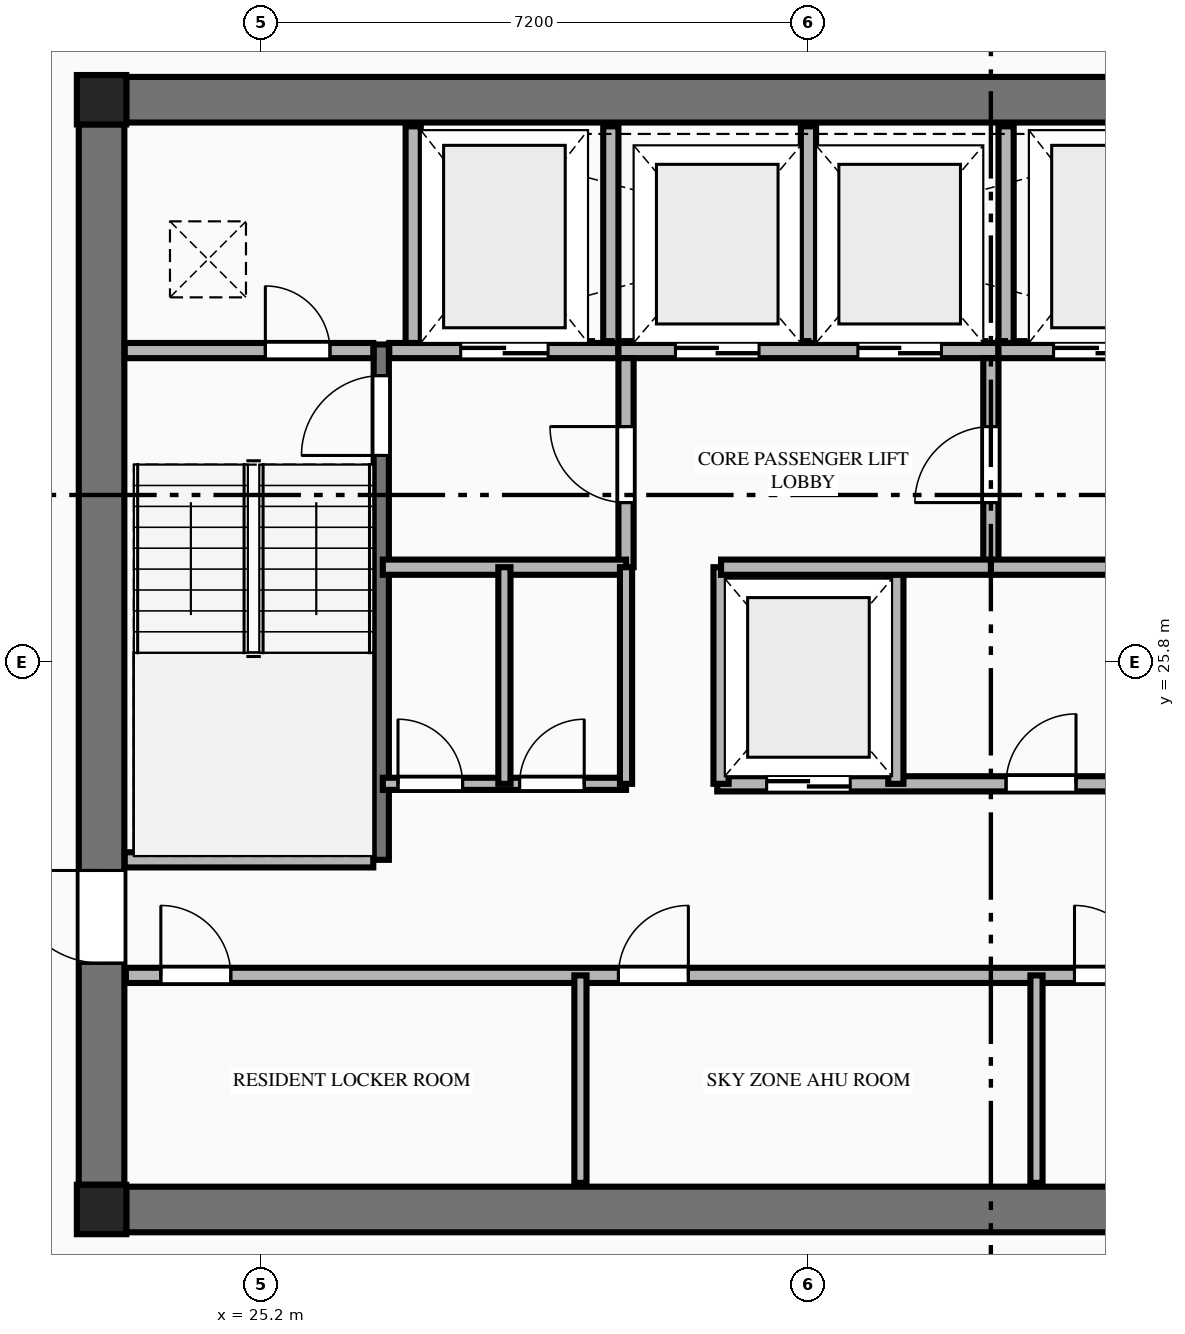
"""IFC4 building model, lengths in metres.
Left out: names, types, materials, properties, quantities, classifications, styles, units other than length and angle.
Written with IfcOpenShell. Run it as: python <this file> out.ifc"""

import sys

from ifc_helpers import new_model, si_unit, direction, frame, frame_2d, origin, origin_2d, place, context, subcontext, project, spatial, rectangle, extrude, element, fill, save


model = new_model("IFC4")
c1 = context("Model", 3, precision=1e-05, world=origin(), true_north=direction((0.0, 1.0)))
c2 = subcontext(c1, "Body", "Model", "MODEL_VIEW")
j1 = project(units=[si_unit("LENGTHUNIT", "METRE"), si_unit("PLANEANGLEUNIT", "RADIAN")], contexts=[c1])
p1 = place(None, origin())
s1 = spatial("IfcSite", under=j1, at=p1, CompositionType="ELEMENT")
p2 = place(p1, origin())
s2 = spatial("IfcBuilding", under=s1, at=p2, CompositionType="ELEMENT")
p3 = place(p2, frame((0.0, 0.0, 186.1)))
s3 = spatial("IfcBuildingStorey", under=s2, at=p3, CompositionType="ELEMENT", Elevation=186.1)
for number, where, z_axis, x_axis in (
    (1, (23.1, 18.6, 0.0), (0.0, 0.0, 1.0), (1.0, 0.0, 0.0)),
    (2, (23.1, 33.2, 0.0), (0.0, 0.0, 1.0), (1.0, 0.0, 0.0)),
):
    element("IfcColumn", number, at=place(p3, frame(where, z_axis=z_axis, x_axis=x_axis)), inside=s3, PredefinedType="COLUMN", context=c2, shape_type="SweptSolid", body=[
        extrude(rectangle(XDim=0.65, YDim=0.65, at=origin_2d()), origin(), (0.0, 0.0, 1.0), 3.55),
    ])
for number, where, z_axis, x_axis in (
    (3, (23.425, 18.6, 0.0), (0.0, 0.0, 1.0), (1.0, 0.0, 0.0)),
    (4, (23.425, 33.2, 0.0), (0.0, 0.0, 1.0), (1.0, 0.0, 0.0)),
):
    element("IfcWall", number, at=place(p3, frame(where, z_axis=z_axis, x_axis=x_axis)), inside=s3, PredefinedType="SHEAR", context=c2, shape_type="SweptSolid", body=[
        extrude(rectangle(XDim=17.95, YDim=0.6, at=frame_2d((8.975, 0.0))), origin(), (0.0, 0.0, 1.0), 3.35),
    ])
p4 = place(p3, frame((23.1, 18.925, 0.0), z_axis=(0.0, 0.0, 1.0), x_axis=(0.0, 1.0, 0.0)))
e5 = element("IfcWall", 5, at=p4, inside=s3, PredefinedType="SHEAR", context=c2, shape_type="SweptSolid", body=[
    extrude(rectangle(XDim=13.95, YDim=0.6, at=frame_2d((6.975, 0.0))), origin(), (0.0, 0.0, 1.0), 3.35),
])
p5 = place(p4, frame((2.915, 0.0, 0.0)))
e6 = element("IfcOpeningElement", 6, at=p5, cuts=e5, PredefinedType="OPENING", context=c2, shape_type="SweptSolid", body=[
    extrude(rectangle(XDim=1.22, YDim=2.25, at=frame_2d((0.61, 1.125))), frame((0.0, 0.31, 0.0), z_axis=(0.0, -1.0, 0.0), x_axis=(1.0, 0.0, 0.0)), (0.0, 0.0, 1.0), 0.62),
])
p6 = place(p3, frame((26.78, 23.2, 0.0), z_axis=(0.0, 0.0, 1.0), x_axis=(0.0, 1.0, 0.0)))
e7 = element("IfcWall", 7, at=p6, inside=s3, PredefinedType="SHEAR", context=c2, shape_type="SweptSolid", body=[
    extrude(rectangle(XDim=6.78, YDim=0.2, at=frame_2d((3.39, 0.0))), origin(), (0.0, 0.0, 1.0), 3.55),
])
p7 = place(p6, frame((5.32, 0.0, 0.0)))
e8 = element("IfcOpeningElement", 8, at=p7, cuts=e7, PredefinedType="OPENING", context=c2, shape_type="SweptSolid", body=[
    extrude(rectangle(XDim=1.05, YDim=2.15, at=frame_2d((0.525, 1.075))), frame((0.0, 0.11, 0.0), z_axis=(0.0, -1.0, 0.0), x_axis=(1.0, 0.0, 0.0)), (0.0, 0.0, 1.0), 0.22),
])
p8 = place(p3, frame((23.405, 23.2, 0.0), z_axis=(0.0, 0.0, 1.0), x_axis=(1.0, 0.0, 0.0)))
e9 = element("IfcWall", 9, at=p8, inside=s3, PredefinedType="PLUMBINGWALL", context=c2, shape_type="SweptSolid", body=[
    extrude(rectangle(XDim=3.27, YDim=0.2, at=frame_2d((1.635, 0.0))), origin(), (0.0, 0.0, 1.0), 3.35),
])
p9 = place(p3, frame((23.405, 29.9, 0.0), z_axis=(0.0, 0.0, 1.0), x_axis=(1.0, 0.0, 0.0)))
e10 = element("IfcWall", 10, at=p9, inside=s3, PredefinedType="PLUMBINGWALL", context=c2, shape_type="SweptSolid", body=[
    extrude(rectangle(XDim=3.27, YDim=0.2, at=frame_2d((1.635, 0.0))), origin(), (0.0, 0.0, 1.0), 3.35),
])
p10 = place(p9, frame((1.85, 0.0, 0.0)))
e11 = element("IfcOpeningElement", 11, at=p10, cuts=e10, PredefinedType="OPENING", context=c2, shape_type="SweptSolid", body=[
    extrude(rectangle(XDim=0.85, YDim=2.05, at=frame_2d((0.425, 1.025))), frame((0.0, 0.11, 0.0), z_axis=(0.0, -1.0, 0.0), x_axis=(1.0, 0.0, 0.0)), (0.0, 0.0, 1.0), 0.22),
])
p11 = place(p3, frame((26.885, 29.9, 0.0), z_axis=(0.0, 0.0, 1.0), x_axis=(1.0, 0.0, 0.0)))
e12 = element("IfcWall", 12, at=p11, inside=s3, PredefinedType="PLUMBINGWALL", context=c2, shape_type="SweptSolid", body=[
    extrude(rectangle(XDim=3.015, YDim=0.2, at=frame_2d((1.507, 0.0))), origin(), (0.0, 0.0, 1.0), 3.35),
])
p12 = place(p11, frame((0.94, 0.0, 0.0)))
e13 = element("IfcOpeningElement", 13, at=p12, cuts=e12, PredefinedType="OPENING", context=c2, shape_type="SweptSolid", body=[
    extrude(rectangle(XDim=1.15, YDim=2.2, at=frame_2d((0.575, 1.1))), frame((0.0, 0.11, 0.0), z_axis=(0.0, -1.0, 0.0), x_axis=(1.0, 0.0, 0.0)), (0.0, 0.0, 1.0), 0.22),
])
p13 = place(p3, frame((29.9, 29.9, 0.0), z_axis=(0.0, 0.0, 1.0), x_axis=(1.0, 0.0, 0.0)))
e14 = element("IfcWall", 14, at=p13, inside=s3, PredefinedType="PLUMBINGWALL", context=c2, shape_type="SweptSolid", body=[
    extrude(rectangle(XDim=5.0, YDim=0.2, at=frame_2d((2.5, 0.0))), origin(), (0.0, 0.0, 1.0), 3.35),
])
p14 = place(p13, frame((0.75, 0.0, 0.0)))
e15 = element("IfcOpeningElement", 15, at=p14, cuts=e14, PredefinedType="OPENING", context=c2, shape_type="SweptSolid", body=[
    extrude(rectangle(XDim=1.1, YDim=2.2, at=frame_2d((0.55, 1.1))), frame((0.0, 0.11, 0.0), z_axis=(0.0, -1.0, 0.0), x_axis=(1.0, 0.0, 0.0)), (0.0, 0.0, 1.0), 0.22),
])
p15 = place(p13, frame((3.15, 0.0, 0.0)))
e16 = element("IfcOpeningElement", 16, at=p15, cuts=e14, PredefinedType="OPENING", context=c2, shape_type="SweptSolid", body=[
    extrude(rectangle(XDim=1.1, YDim=2.2, at=frame_2d((0.55, 1.1))), frame((0.0, 0.11, 0.0), z_axis=(0.0, -1.0, 0.0), x_axis=(1.0, 0.0, 0.0)), (0.0, 0.0, 1.0), 0.22),
])
p16 = place(p3, frame((34.9, 29.9, 0.0), z_axis=(0.0, 0.0, 1.0), x_axis=(1.0, 0.0, 0.0)))
e17 = element("IfcWall", 17, at=p16, inside=s3, PredefinedType="PLUMBINGWALL", context=c2, shape_type="SweptSolid", body=[
    extrude(rectangle(XDim=3.015, YDim=0.2, at=frame_2d((1.508, 0.0))), origin(), (0.0, 0.0, 1.0), 3.35),
])
p17 = place(p16, frame((0.725, 0.0, 0.0)))
e18 = element("IfcOpeningElement", 18, at=p17, cuts=e17, PredefinedType="OPENING", context=c2, shape_type="SweptSolid", body=[
    extrude(rectangle(XDim=1.15, YDim=2.2, at=frame_2d((0.575, 1.1))), frame((0.0, 0.11, 0.0), z_axis=(0.0, -1.0, 0.0), x_axis=(1.0, 0.0, 0.0)), (0.0, 0.0, 1.0), 0.22),
])
for number, where, z_axis, x_axis in (
    (19, (27.2, 30.0, 0.0), (0.0, 0.0, 1.0), (0.0, 1.0, 0.0)),
    (20, (29.8, 30.0, 0.0), (0.0, 0.0, 1.0), (0.0, 1.0, 0.0)),
    (21, (32.4, 30.0, 0.0), (0.0, 0.0, 1.0), (0.0, 1.0, 0.0)),
    (22, (35.0, 30.0, 0.0), (0.0, 0.0, 1.0), (0.0, 1.0, 0.0)),
):
    element("IfcWall", number, at=place(p3, frame(where, z_axis=z_axis, x_axis=x_axis)), inside=s3, PredefinedType="PLUMBINGWALL", context=c2, shape_type="SweptSolid", body=[
        extrude(rectangle(XDim=2.85, YDim=0.2, at=frame_2d((1.425, 0.0))), origin(), (0.0, 0.0, 1.0), 3.35),
    ])
p18 = place(p3, frame((30.0, 27.05, 0.0), z_axis=(0.0, 0.0, 1.0), x_axis=(0.0, 1.0, 0.0)))
e23 = element("IfcWall", 23, at=p18, inside=s3, PredefinedType="PLUMBINGWALL", context=c2, shape_type="SweptSolid", body=[
    extrude(rectangle(XDim=2.75, YDim=0.2, at=frame_2d((1.375, 0.0))), origin(), (0.0, 0.0, 1.0), 3.35),
])
p19 = place(p18, frame((0.85, 0.0, 0.0)))
e24 = element("IfcOpeningElement", 24, at=p19, cuts=e23, PredefinedType="OPENING", context=c2, shape_type="SweptSolid", body=[
    extrude(rectangle(XDim=1.0, YDim=2.15, at=frame_2d((0.5, 1.075))), frame((0.0, 0.11, 0.0), z_axis=(0.0, -1.0, 0.0), x_axis=(1.0, 0.0, 0.0)), (0.0, 0.0, 1.0), 0.22),
])
p20 = place(p3, frame((26.8, 27.05, 0.0), z_axis=(0.0, 0.0, 1.0), x_axis=(1.0, 0.0, 0.0)))
e25 = element("IfcWall", 25, at=p20, inside=s3, PredefinedType="PLUMBINGWALL", context=c2, shape_type="SweptSolid", body=[
    extrude(rectangle(XDim=3.2, YDim=0.2, at=frame_2d((1.6, 0.0))), origin(), (0.0, 0.0, 1.0), 3.35),
])
p21 = place(p3, frame((34.8, 27.05, 0.0), z_axis=(0.0, 0.0, 1.0), x_axis=(0.0, 1.0, 0.0)))
e26 = element("IfcWall", 26, at=p21, inside=s3, PredefinedType="PLUMBINGWALL", context=c2, shape_type="SweptSolid", body=[
    extrude(rectangle(XDim=2.75, YDim=0.2, at=frame_2d((1.375, 0.0))), origin(), (0.0, 0.0, 1.0), 3.35),
])
p22 = place(p21, frame((0.85, 0.0, 0.0)))
e27 = element("IfcOpeningElement", 27, at=p22, cuts=e26, PredefinedType="OPENING", context=c2, shape_type="SweptSolid", body=[
    extrude(rectangle(XDim=1.0, YDim=2.15, at=frame_2d((0.5, 1.075))), frame((0.0, 0.11, 0.0), z_axis=(0.0, -1.0, 0.0), x_axis=(1.0, 0.0, 0.0)), (0.0, 0.0, 1.0), 0.22),
])
p23 = place(p3, frame((34.8, 27.05, 0.0), z_axis=(0.0, 0.0, 1.0), x_axis=(1.0, 0.0, 0.0)))
e28 = element("IfcWall", 28, at=p23, inside=s3, PredefinedType="PLUMBINGWALL", context=c2, shape_type="SweptSolid", body=[
    extrude(rectangle(XDim=3.2, YDim=0.2, at=frame_2d((1.6, 0.0))), origin(), (0.0, 0.0, 1.0), 3.35),
])
p24 = place(p3, frame((26.8, 24.2, 0.0), z_axis=(0.0, 0.0, 1.0), x_axis=(1.0, 0.0, 0.0)))
e29 = element("IfcWall", 29, at=p24, inside=s3, PredefinedType="PARTITIONING", context=c2, shape_type="SweptSolid", body=[
    extrude(rectangle(XDim=3.2, YDim=0.16, at=frame_2d((1.6, 0.0))), origin(), (0.0, 0.0, 1.0), 3.35),
])
p25 = place(p24, frame((0.2, 0.0, 0.0)))
e30 = element("IfcOpeningElement", 30, at=p25, cuts=e29, PredefinedType="OPENING", context=c2, shape_type="SweptSolid", body=[
    extrude(rectangle(XDim=0.85, YDim=2.05, at=frame_2d((0.425, 1.025))), frame((0.0, 0.09, 0.0), z_axis=(0.0, -1.0, 0.0), x_axis=(1.0, 0.0, 0.0)), (0.0, 0.0, 1.0), 0.18),
])
p26 = place(p24, frame((1.8, 0.0, 0.0)))
e31 = element("IfcOpeningElement", 31, at=p26, cuts=e29, PredefinedType="OPENING", context=c2, shape_type="SweptSolid", body=[
    extrude(rectangle(XDim=0.85, YDim=2.05, at=frame_2d((0.425, 1.025))), frame((0.0, 0.09, 0.0), z_axis=(0.0, -1.0, 0.0), x_axis=(1.0, 0.0, 0.0)), (0.0, 0.0, 1.0), 0.18),
])
p27 = place(p3, frame((30.0, 24.2, 0.0), z_axis=(0.0, 0.0, 1.0), x_axis=(0.0, 1.0, 0.0)))
e32 = element("IfcWall", 32, at=p27, inside=s3, PredefinedType="PARTITIONING", context=c2, shape_type="SweptSolid", body=[
    extrude(rectangle(XDim=2.85, YDim=0.16, at=frame_2d((1.425, 0.0))), origin(), (0.0, 0.0, 1.0), 3.35),
])
p28 = place(p3, frame((31.2, 24.2, 0.0), z_axis=(0.0, 0.0, 1.0), x_axis=(1.0, 0.0, 0.0)))
e33 = element("IfcWall", 33, at=p28, inside=s3, PredefinedType="PLUMBINGWALL", context=c2, shape_type="SweptSolid", body=[
    extrude(rectangle(XDim=6.8, YDim=0.2, at=frame_2d((3.4, 0.0))), origin(), (0.0, 0.0, 1.0), 3.35),
])
p29 = place(p28, frame((0.65, 0.0, 0.0)))
e34 = element("IfcOpeningElement", 34, at=p29, cuts=e33, PredefinedType="OPENING", context=c2, shape_type="SweptSolid", body=[
    extrude(rectangle(XDim=1.1, YDim=2.2, at=frame_2d((0.55, 1.1))), frame((0.0, 0.11, 0.0), z_axis=(0.0, -1.0, 0.0), x_axis=(1.0, 0.0, 0.0)), (0.0, 0.0, 1.0), 0.22),
])
p30 = place(p28, frame((3.8, 0.0, 0.0)))
e35 = element("IfcOpeningElement", 35, at=p30, cuts=e33, PredefinedType="OPENING", context=c2, shape_type="SweptSolid", body=[
    extrude(rectangle(XDim=0.92, YDim=2.15, at=frame_2d((0.46, 1.075))), frame((0.0, 0.11, 0.0), z_axis=(0.0, -1.0, 0.0), x_axis=(1.0, 0.0, 0.0)), (0.0, 0.0, 1.0), 0.22),
])
for number, where, z_axis, x_axis in (
    (36, (31.25, 24.2, 0.0), (0.0, 0.0, 1.0), (0.0, 1.0, 0.0)),
    (37, (33.55, 24.2, 0.0), (0.0, 0.0, 1.0), (0.0, 1.0, 0.0)),
):
    element("IfcWall", number, at=place(p3, frame(where, z_axis=z_axis, x_axis=x_axis)), inside=s3, PredefinedType="PLUMBINGWALL", context=c2, shape_type="SweptSolid", body=[
        extrude(rectangle(XDim=2.85, YDim=0.2, at=frame_2d((1.425, 0.0))), origin(), (0.0, 0.0, 1.0), 3.35),
    ])
p31 = place(p3, frame((31.25, 27.05, 0.0), z_axis=(0.0, 0.0, 1.0), x_axis=(1.0, 0.0, 0.0)))
e38 = element("IfcWall", 38, at=p31, inside=s3, PredefinedType="PLUMBINGWALL", context=c2, shape_type="SweptSolid", body=[
    extrude(rectangle(XDim=3.55, YDim=0.2, at=frame_2d((1.775, 0.0))), origin(), (0.0, 0.0, 1.0), 3.35),
])
p32 = place(p3, frame((28.4, 24.2, 0.0), z_axis=(0.0, 0.0, 1.0), x_axis=(0.0, 1.0, 0.0)))
e39 = element("IfcWall", 39, at=p32, inside=s3, PredefinedType="PARTITIONING", context=c2, shape_type="SweptSolid", body=[
    extrude(rectangle(XDim=2.85, YDim=0.16, at=frame_2d((1.425, 0.0))), origin(), (0.0, 0.0, 1.0), 3.35),
])
p33 = place(p3, frame((23.42, 21.68, 0.0), z_axis=(0.0, 0.0, 1.0), x_axis=(1.0, 0.0, 0.0)))
e40 = element("IfcWall", 40, at=p33, inside=s3, PredefinedType="PLUMBINGWALL", context=c2, shape_type="SweptSolid", body=[
    extrude(rectangle(XDim=17.96, YDim=0.2, at=frame_2d((8.98, 0.0))), origin(), (0.0, 0.0, 1.0), 3.35),
])
p34 = place(p33, frame((0.46, 0.0, 0.0)))
e41 = element("IfcOpeningElement", 41, at=p34, cuts=e40, PredefinedType="OPENING", context=c2, shape_type="SweptSolid", body=[
    extrude(rectangle(XDim=0.92, YDim=2.15, at=frame_2d((0.46, 1.075))), frame((0.0, 0.11, 0.0), z_axis=(0.0, -1.0, 0.0), x_axis=(1.0, 0.0, 0.0)), (0.0, 0.0, 1.0), 0.22),
])
p35 = place(p33, frame((6.48, 0.0, 0.0)))
e42 = element("IfcOpeningElement", 42, at=p35, cuts=e40, PredefinedType="OPENING", context=c2, shape_type="SweptSolid", body=[
    extrude(rectangle(XDim=0.92, YDim=2.15, at=frame_2d((0.46, 1.075))), frame((0.0, 0.11, 0.0), z_axis=(0.0, -1.0, 0.0), x_axis=(1.0, 0.0, 0.0)), (0.0, 0.0, 1.0), 0.22),
])
p36 = place(p33, frame((12.48, 0.0, 0.0)))
e43 = element("IfcOpeningElement", 43, at=p36, cuts=e40, PredefinedType="OPENING", context=c2, shape_type="SweptSolid", body=[
    extrude(rectangle(XDim=0.92, YDim=2.15, at=frame_2d((0.46, 1.075))), frame((0.0, 0.11, 0.0), z_axis=(0.0, -1.0, 0.0), x_axis=(1.0, 0.0, 0.0)), (0.0, 0.0, 1.0), 0.22),
])
for number, where, z_axis, x_axis in (
    (44, (29.4, 18.95, 0.0), (0.0, 0.0, 1.0), (0.0, 1.0, 0.0)),
    (45, (35.4, 18.95, 0.0), (0.0, 0.0, 1.0), (0.0, 1.0, 0.0)),
):
    element("IfcWall", number, at=place(p3, frame(where, z_axis=z_axis, x_axis=x_axis)), inside=s3, PredefinedType="PARTITIONING", context=c2, shape_type="SweptSolid", body=[
        extrude(rectangle(XDim=2.73, YDim=0.16, at=frame_2d((1.365, 0.0))), origin(), (0.0, 0.0, 1.0), 3.35),
    ])
p37 = place(p5, origin())
e46 = element("IfcDoor", 46, at=p37, inside=s3, OperationType="SINGLE_SWING_RIGHT", PredefinedType="DOOR", context=c2, shape_type="SweptSolid", body=[
    extrude(rectangle(XDim=1.22, YDim=2.25, at=frame_2d((0.61, 1.125))), frame((0.0, 0.025, 0.0), z_axis=(0.0, -1.0, 0.0), x_axis=(1.0, 0.0, 0.0)), (0.0, 0.0, 1.0), 0.05),
])
fill(e6, e46)
p38 = place(p7, origin())
e47 = element("IfcDoor", 47, at=p38, inside=s3, OperationType="SINGLE_SWING_LEFT", PredefinedType="DOOR", context=c2, shape_type="SweptSolid", body=[
    extrude(rectangle(XDim=1.05, YDim=2.15, at=frame_2d((0.525, 1.075))), frame((0.0, 0.025, 0.0), z_axis=(0.0, -1.0, 0.0), x_axis=(1.0, 0.0, 0.0)), (0.0, 0.0, 1.0), 0.05),
])
fill(e8, e47)
p39 = place(p10, origin())
e48 = element("IfcDoor", 48, at=p39, inside=s3, OperationType="SINGLE_SWING_LEFT", PredefinedType="DOOR", context=c2, shape_type="SweptSolid", body=[
    extrude(rectangle(XDim=0.85, YDim=2.05, at=frame_2d((0.425, 1.025))), frame((0.0, 0.025, 0.0), z_axis=(0.0, -1.0, 0.0), x_axis=(1.0, 0.0, 0.0)), (0.0, 0.0, 1.0), 0.05),
])
fill(e11, e48)
p40 = place(p12, origin())
e49 = element("IfcDoor", 49, at=p40, inside=s3, OperationType="DOUBLE_DOOR_SLIDING", PredefinedType="DOOR", context=c2, shape_type="SweptSolid", body=[
    extrude(rectangle(XDim=1.15, YDim=2.2, at=frame_2d((0.575, 1.1))), frame((0.0, 0.025, 0.0), z_axis=(0.0, -1.0, 0.0), x_axis=(1.0, 0.0, 0.0)), (0.0, 0.0, 1.0), 0.05),
])
fill(e13, e49)
p41 = place(p17, origin())
e50 = element("IfcDoor", 50, at=p41, inside=s3, OperationType="DOUBLE_DOOR_SLIDING", PredefinedType="DOOR", context=c2, shape_type="SweptSolid", body=[
    extrude(rectangle(XDim=1.15, YDim=2.2, at=frame_2d((0.575, 1.1))), frame((0.0, 0.025, 0.0), z_axis=(0.0, -1.0, 0.0), x_axis=(1.0, 0.0, 0.0)), (0.0, 0.0, 1.0), 0.05),
])
fill(e18, e50)
p42 = place(p14, origin())
e51 = element("IfcDoor", 51, at=p42, inside=s3, OperationType="DOUBLE_DOOR_SLIDING", PredefinedType="DOOR", context=c2, shape_type="SweptSolid", body=[
    extrude(rectangle(XDim=1.1, YDim=2.2, at=frame_2d((0.55, 1.1))), frame((0.0, 0.025, 0.0), z_axis=(0.0, -1.0, 0.0), x_axis=(1.0, 0.0, 0.0)), (0.0, 0.0, 1.0), 0.05),
])
fill(e15, e51)
p43 = place(p15, origin())
e52 = element("IfcDoor", 52, at=p43, inside=s3, OperationType="DOUBLE_DOOR_SLIDING", PredefinedType="DOOR", context=c2, shape_type="SweptSolid", body=[
    extrude(rectangle(XDim=1.1, YDim=2.2, at=frame_2d((0.55, 1.1))), frame((0.0, 0.025, 0.0), z_axis=(0.0, -1.0, 0.0), x_axis=(1.0, 0.0, 0.0)), (0.0, 0.0, 1.0), 0.05),
])
fill(e16, e52)
p44 = place(p19, origin())
e53 = element("IfcDoor", 53, at=p44, inside=s3, OperationType="SINGLE_SWING_RIGHT", PredefinedType="DOOR", context=c2, shape_type="SweptSolid", body=[
    extrude(rectangle(XDim=1.0, YDim=2.15, at=frame_2d((0.5, 1.075))), frame((0.0, 0.025, 0.0), z_axis=(0.0, -1.0, 0.0), x_axis=(1.0, 0.0, 0.0)), (0.0, 0.0, 1.0), 0.05),
])
fill(e24, e53)
p45 = place(p22, origin())
e54 = element("IfcDoor", 54, at=p45, inside=s3, OperationType="SINGLE_SWING_LEFT", PredefinedType="DOOR", context=c2, shape_type="SweptSolid", body=[
    extrude(rectangle(XDim=1.0, YDim=2.15, at=frame_2d((0.5, 1.075))), frame((0.0, 0.025, 0.0), z_axis=(0.0, -1.0, 0.0), x_axis=(1.0, 0.0, 0.0)), (0.0, 0.0, 1.0), 0.05),
])
fill(e27, e54)
p46 = place(p29, origin())
e55 = element("IfcDoor", 55, at=p46, inside=s3, OperationType="DOUBLE_DOOR_SLIDING", PredefinedType="DOOR", context=c2, shape_type="SweptSolid", body=[
    extrude(rectangle(XDim=1.1, YDim=2.2, at=frame_2d((0.55, 1.1))), frame((0.0, 0.025, 0.0), z_axis=(0.0, -1.0, 0.0), x_axis=(1.0, 0.0, 0.0)), (0.0, 0.0, 1.0), 0.05),
])
fill(e34, e55)
p47 = place(p25, origin())
e56 = element("IfcDoor", 56, at=p47, inside=s3, OperationType="SINGLE_SWING_LEFT", PredefinedType="DOOR", context=c2, shape_type="SweptSolid", body=[
    extrude(rectangle(XDim=0.85, YDim=2.05, at=frame_2d((0.425, 1.025))), frame((0.0, 0.025, 0.0), z_axis=(0.0, -1.0, 0.0), x_axis=(1.0, 0.0, 0.0)), (0.0, 0.0, 1.0), 0.05),
])
fill(e30, e56)
p48 = place(p26, origin())
e57 = element("IfcDoor", 57, at=p48, inside=s3, OperationType="SINGLE_SWING_RIGHT", PredefinedType="DOOR", context=c2, shape_type="SweptSolid", body=[
    extrude(rectangle(XDim=0.85, YDim=2.05, at=frame_2d((0.425, 1.025))), frame((0.0, 0.025, 0.0), z_axis=(0.0, -1.0, 0.0), x_axis=(1.0, 0.0, 0.0)), (0.0, 0.0, 1.0), 0.05),
])
fill(e31, e57)
p49 = place(p30, origin())
e58 = element("IfcDoor", 58, at=p49, inside=s3, OperationType="SINGLE_SWING_RIGHT", PredefinedType="DOOR", context=c2, shape_type="SweptSolid", body=[
    extrude(rectangle(XDim=0.92, YDim=2.15, at=frame_2d((0.46, 1.075))), frame((0.0, 0.025, 0.0), z_axis=(0.0, -1.0, 0.0), x_axis=(1.0, 0.0, 0.0)), (0.0, 0.0, 1.0), 0.05),
])
fill(e35, e58)
p50 = place(p34, origin())
e59 = element("IfcDoor", 59, at=p50, inside=s3, OperationType="SINGLE_SWING_LEFT", PredefinedType="DOOR", context=c2, shape_type="SweptSolid", body=[
    extrude(rectangle(XDim=0.92, YDim=2.15, at=frame_2d((0.46, 1.075))), frame((0.0, 0.025, 0.0), z_axis=(0.0, -1.0, 0.0), x_axis=(1.0, 0.0, 0.0)), (0.0, 0.0, 1.0), 0.05),
])
fill(e41, e59)
p51 = place(p35, origin())
e60 = element("IfcDoor", 60, at=p51, inside=s3, OperationType="SINGLE_SWING_RIGHT", PredefinedType="DOOR", context=c2, shape_type="SweptSolid", body=[
    extrude(rectangle(XDim=0.92, YDim=2.15, at=frame_2d((0.46, 1.075))), frame((0.0, 0.025, 0.0), z_axis=(0.0, -1.0, 0.0), x_axis=(1.0, 0.0, 0.0)), (0.0, 0.0, 1.0), 0.05),
])
fill(e42, e60)
p52 = place(p36, origin())
e61 = element("IfcDoor", 61, at=p52, inside=s3, OperationType="SINGLE_SWING_LEFT", PredefinedType="DOOR", context=c2, shape_type="SweptSolid", body=[
    extrude(rectangle(XDim=0.92, YDim=2.15, at=frame_2d((0.46, 1.075))), frame((0.0, 0.025, 0.0), z_axis=(0.0, -1.0, 0.0), x_axis=(1.0, 0.0, 0.0)), (0.0, 0.0, 1.0), 0.05),
])
fill(e43, e61)
save(model, sys.argv[1])
